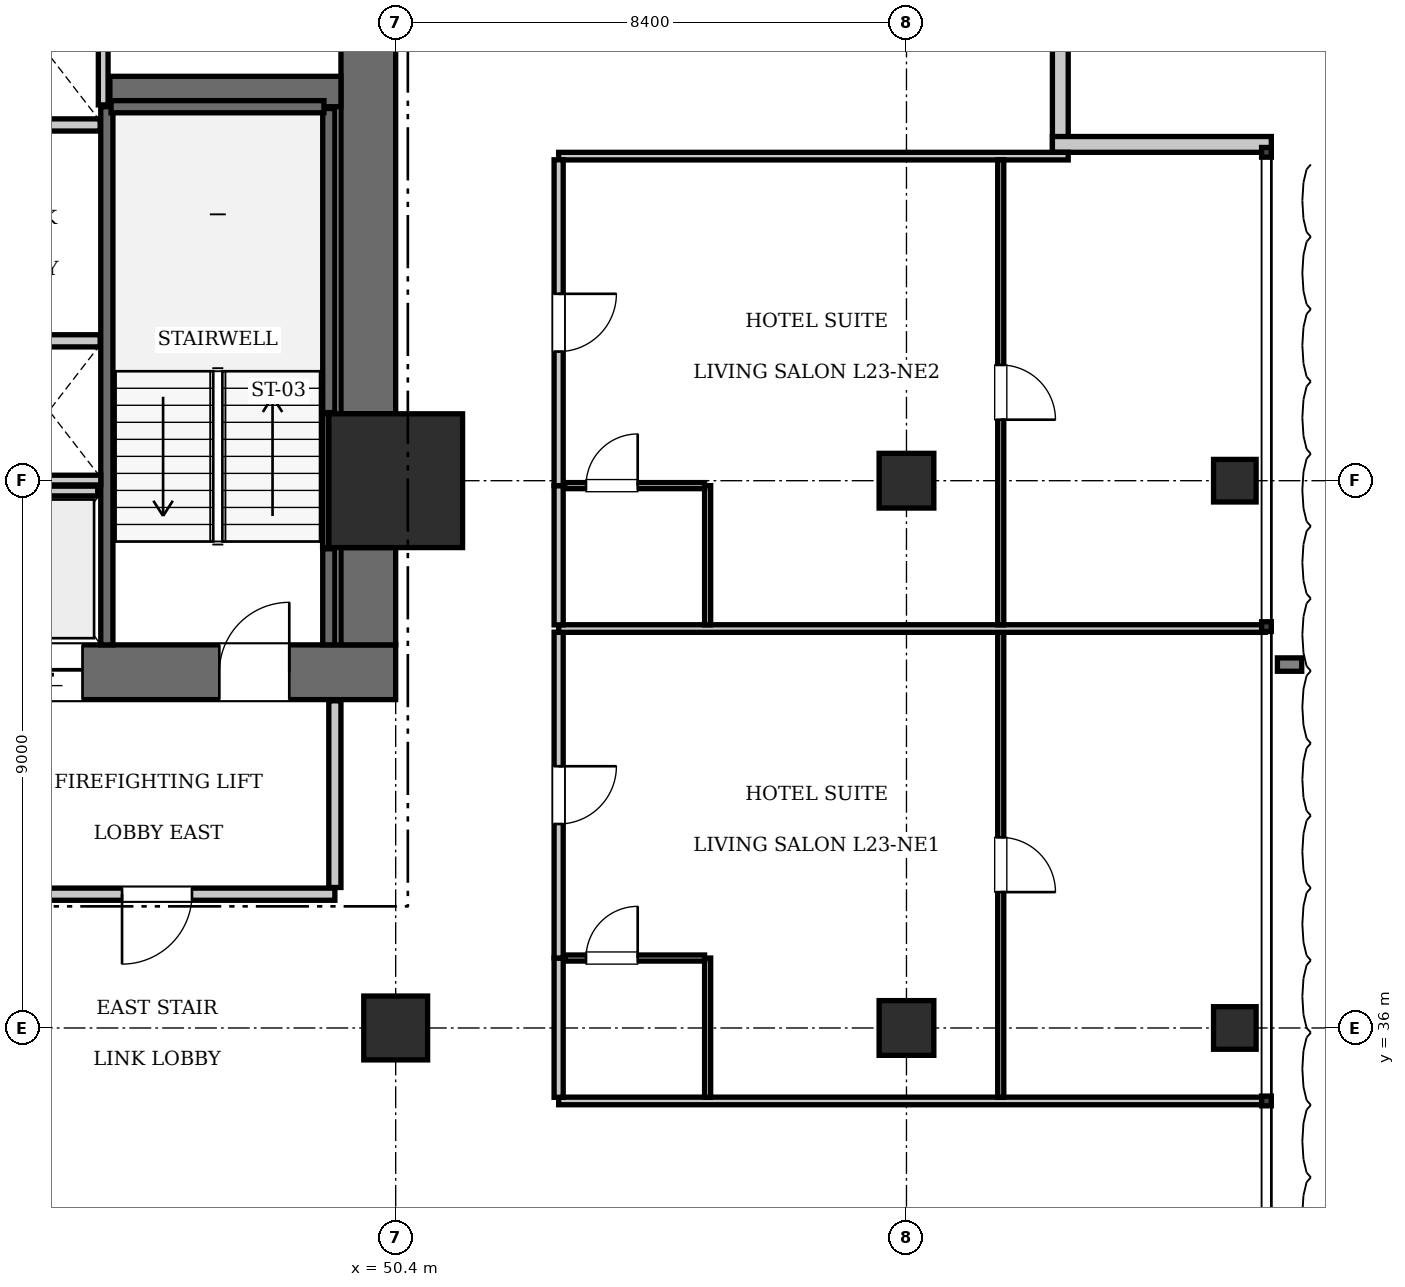
"""IFC4 building model, lengths in metres.
Left out: names, types, materials, properties, quantities, classifications, styles, units other than length and angle.
Written with IfcOpenShell. Run it as: python <this file> out.ifc"""

import sys

from ifc_helpers import new_model, si_unit, direction, frame, frame_2d, origin, origin_2d, place, context, subcontext, project, spatial, rectangle, i_section, extrude, element, fill, save


model = new_model("IFC4")
c1 = context("Model", 3, precision=1e-05, world=origin(), true_north=direction((0.0, 1.0)))
c2 = subcontext(c1, "Body", "Model", "MODEL_VIEW")
j1 = project(units=[si_unit("LENGTHUNIT", "METRE"), si_unit("PLANEANGLEUNIT", "RADIAN")], contexts=[c1])
p1 = place(None, origin())
s1 = spatial("IfcSite", under=j1, at=p1, CompositionType="ELEMENT")
p2 = place(p1, origin())
s2 = spatial("IfcBuilding", under=s1, at=p2, CompositionType="ELEMENT")
p3 = place(p2, frame((0.0, 0.0, 96.25)))
s3 = spatial("IfcBuildingStorey", under=s2, at=p3, CompositionType="ELEMENT", Elevation=96.25)
p4 = place(p3, frame((50.4, 45.0, 0.0), z_axis=(0.0, 0.0, 1.0), x_axis=(1.0, 0.0, 0.0)))
e1 = element("IfcColumn", 1, at=p4, inside=s3, PredefinedType="COLUMN", context=c2, shape_type="SweptSolid", body=[
    extrude(rectangle(XDim=2.2, YDim=2.2, at=origin_2d()), origin(), (0.0, 0.0, 1.0), 3.85),
])
p5 = place(p3, frame((43.6, 41.85, 0.0), z_axis=(0.0, 0.0, 1.0), x_axis=(1.0, 0.0, 0.0)))
e2 = element("IfcWall", 2, at=p5, inside=s3, PredefinedType="SHEAR", context=c2, shape_type="SweptSolid", body=[
    extrude(rectangle(XDim=6.8, YDim=0.9, at=frame_2d((3.4, 0.0))), origin(), (0.0, 0.0, 1.0), 3.85),
])
p6 = place(p5, frame((3.9, 0.0, 0.0)))
e3 = element("IfcOpeningElement", 3, at=p6, cuts=e2, PredefinedType="OPENING", context=c2, shape_type="SweptSolid", body=[
    extrude(rectangle(XDim=1.15, YDim=2.15, at=frame_2d((0.575, 1.075))), frame((0.0, 0.46, 0.0), z_axis=(0.0, -1.0, 0.0), x_axis=(1.0, 0.0, 0.0)), (0.0, 0.0, 1.0), 0.92),
])
p7 = place(p5, frame((0.55, 0.0, 0.0)))
e4 = element("IfcOpeningElement", 4, at=p7, cuts=e2, PredefinedType="OPENING", context=c2, shape_type="SweptSolid", body=[
    extrude(rectangle(XDim=1.1, YDim=2.2, at=frame_2d((0.55, 1.1))), frame((0.0, 0.46, 0.0), z_axis=(0.0, -1.0, 0.0), x_axis=(1.0, 0.0, 0.0)), (0.0, 0.0, 1.0), 0.92),
])
p8 = place(p3, frame((49.95, 42.3, 0.0), z_axis=(0.0, 0.0, 1.0), x_axis=(0.0, 1.0, 0.0)))
e5 = element("IfcWall", 5, at=p8, inside=s3, PredefinedType="SHEAR", context=c2, shape_type="SweptSolid", body=[
    extrude(rectangle(XDim=1.6, YDim=0.9, at=frame_2d((0.8, 0.0))), origin(), (0.0, 0.0, 1.0), 3.85),
])
p9 = place(p3, frame((49.95, 46.1, 0.0), z_axis=(0.0, 0.0, 1.0), x_axis=(0.0, 1.0, 0.0)))
e6 = element("IfcWall", 6, at=p9, inside=s3, PredefinedType="SHEAR", context=c2, shape_type="SweptSolid", body=[
    extrude(rectangle(XDim=7.0, YDim=0.9, at=frame_2d((3.5, 0.0))), origin(), (0.0, 0.0, 1.0), 3.85),
])
p10 = place(p3, frame((45.7, 51.4, 0.0), z_axis=(0.0, 0.0, 1.0), x_axis=(1.0, 0.0, 0.0)))
e7 = element("IfcWall", 7, at=p10, inside=s3, PredefinedType="SHEAR", context=c2, shape_type="SweptSolid", body=[
    extrude(rectangle(XDim=3.8, YDim=0.5, at=frame_2d((1.9, 0.0))), origin(), (0.0, 0.0, 1.0), 3.85),
])
p11 = place(p3, frame((50.4, 36.0, 0.0), z_axis=(0.0, 0.0, 1.0), x_axis=(1.0, 0.0, 0.0)))
e8 = element("IfcColumn", 8, at=p11, inside=s3, PredefinedType="COLUMN", context=c2, shape_type="SweptSolid", body=[
    extrude(rectangle(XDim=1.05, YDim=1.05, at=origin_2d()), origin(), (0.0, 0.0, 1.0), 3.85),
])
for number, where, z_axis, x_axis in (
    (9, (58.8, 36.0, 0.0), (0.0, 0.0, 1.0), (1.0, 0.0, 0.0)),
    (10, (58.8, 45.0, 0.0), (0.0, 0.0, 1.0), (1.0, 0.0, 0.0)),
):
    element("IfcColumn", number, at=place(p3, frame(where, z_axis=z_axis, x_axis=x_axis)), inside=s3, PredefinedType="COLUMN", context=c2, shape_type="SweptSolid", body=[
        extrude(rectangle(XDim=0.9, YDim=0.9, at=origin_2d()), origin(), (0.0, 0.0, 1.0), 3.85),
    ])
for number, where, z_axis, x_axis in (
    (11, (64.2, 36.0, 0.0), (0.0, 0.0, 1.0), (1.0, 0.0, 0.0)),
    (12, (64.2, 45.0, 0.0), (0.0, 0.0, 1.0), (1.0, 0.0, 0.0)),
):
    element("IfcColumn", number, at=place(p3, frame(where, z_axis=z_axis, x_axis=x_axis)), inside=s3, PredefinedType="COLUMN", context=c2, shape_type="SweptSolid", body=[
        extrude(i_section(OverallWidth=0.7, OverallDepth=0.7, WebThickness=0.028, FlangeThickness=0.044, at=origin_2d()), origin(), (0.0, 0.0, 1.0), 3.85),
    ])
p12 = place(p3, frame((45.65, 42.3, 0.0), z_axis=(0.0, 0.0, 1.0), x_axis=(0.0, 1.0, 0.0)))
e13 = element("IfcWall", 13, at=p12, inside=s3, PredefinedType="SOLIDWALL", context=c2, shape_type="SweptSolid", body=[
    extrude(rectangle(XDim=8.85, YDim=0.2, at=frame_2d((4.425, 0.0))), origin(), (0.0, 0.0, 1.0), 3.61),
])
p13 = place(p3, frame((49.3, 42.3, 0.0), z_axis=(0.0, 0.0, 1.0), x_axis=(0.0, 1.0, 0.0)))
e14 = element("IfcWall", 14, at=p13, inside=s3, PredefinedType="SOLIDWALL", context=c2, shape_type="SweptSolid", body=[
    extrude(rectangle(XDim=1.58, YDim=0.2, at=frame_2d((0.79, 0.0))), origin(), (0.0, 0.0, 1.0), 3.61),
])
p14 = place(p3, frame((49.3, 46.12, 0.0), z_axis=(0.0, 0.0, 1.0), x_axis=(0.0, 1.0, 0.0)))
e15 = element("IfcWall", 15, at=p14, inside=s3, PredefinedType="SOLIDWALL", context=c2, shape_type="SweptSolid", body=[
    extrude(rectangle(XDim=5.0, YDim=0.2, at=frame_2d((2.5, 0.0))), origin(), (0.0, 0.0, 1.0), 3.61),
])
p15 = place(p3, frame((45.72, 51.15, 0.0), z_axis=(0.0, 0.0, 1.0), x_axis=(1.0, 0.0, 0.0)))
e16 = element("IfcWall", 16, at=p15, inside=s3, PredefinedType="SOLIDWALL", context=c2, shape_type="SweptSolid", body=[
    extrude(rectangle(XDim=3.5, YDim=0.2, at=frame_2d((1.75, 0.0))), origin(), (0.0, 0.0, 1.0), 3.61),
])
p16 = place(p3, frame((49.248, 43.9, 0.0), z_axis=(0.0, 0.0, 1.0), x_axis=(0.0, 1.0, 0.0)))
e17 = element("IfcWall", 17, at=p16, inside=s3, PredefinedType="SOLIDWALL", context=c2, shape_type="SweptSolid", body=[
    extrude(rectangle(XDim=2.2, YDim=0.1, at=frame_2d((1.1, 0.0))), origin(), (0.0, 0.0, 1.0), 3.61),
])
for number, where, z_axis, x_axis in (
    (18, (43.86, 47.3, 0.0), (0.0, 0.0, 1.0), (1.0, 0.0, 0.0)),
    (19, (43.86, 50.85, 0.0), (0.0, 0.0, 1.0), (1.0, 0.0, 0.0)),
):
    element("IfcWall", number, at=place(p3, frame(where, z_axis=z_axis, x_axis=x_axis)), inside=s3, PredefinedType="SOLIDWALL", context=c2, shape_type="SweptSolid", body=[
        extrude(rectangle(XDim=1.68, YDim=0.2, at=frame_2d((0.84, 0.0))), origin(), (0.0, 0.0, 1.0), 3.61),
    ])
p17 = place(p3, frame((43.9, 44.83, 0.0), z_axis=(0.0, 0.0, 1.0), x_axis=(1.0, 0.0, 0.0)))
e20 = element("IfcWall", 20, at=p17, inside=s3, PredefinedType="SOLIDWALL", context=c2, shape_type="SweptSolid", body=[
    extrude(rectangle(XDim=1.6, YDim=0.16, at=frame_2d((0.8, 0.0))), origin(), (0.0, 0.0, 1.0), 3.61),
])
p18 = place(p3, frame((42.1, 45.01, 0.0), z_axis=(0.0, 0.0, 1.0), x_axis=(1.0, 0.0, 0.0)))
e21 = element("IfcWall", 21, at=p18, inside=s3, PredefinedType="SOLIDWALL", context=c2, shape_type="SweptSolid", body=[
    extrude(rectangle(XDim=3.45, YDim=0.16, at=frame_2d((1.725, 0.0))), origin(), (0.0, 0.0, 1.0), 3.61),
])
p19 = place(p3, frame((45.59, 51.18, 0.0), z_axis=(0.0, 0.0, 1.0), x_axis=(0.0, 1.0, 0.0)))
e22 = element("IfcWall", 22, at=p19, inside=s3, PredefinedType="SOLIDWALL", context=c2, shape_type="SweptSolid", body=[
    extrude(rectangle(XDim=1.92, YDim=0.16, at=frame_2d((0.96, 0.0))), origin(), (0.0, 0.0, 1.0), 3.61),
])
for number, where, z_axis, x_axis in (
    (23, (61.33, 54.0, 0.0), (0.0, 0.0, 1.0), (0.0, -1.0, 0.0)),
    (24, (61.2, 50.53, 0.0), (0.0, 0.0, 1.0), (1.0, 0.0, 0.0)),
):
    element("IfcWall", number, at=place(p3, frame(where, z_axis=z_axis, x_axis=x_axis)), inside=s3, PredefinedType="SOLIDWALL", context=c2, shape_type="SweptSolid", body=[
        extrude(rectangle(XDim=3.6, YDim=0.26, at=frame_2d((1.8, 0.0))), origin(), (0.0, 0.0, 1.0), 3.61),
    ])
p20 = place(p3, frame((43.6, 38.2, 0.0), z_axis=(0.0, 0.0, 1.0), x_axis=(1.0, 0.0, 0.0)))
e25 = element("IfcWall", 25, at=p20, inside=s3, PredefinedType="PARTITIONING", context=c2, shape_type="SweptSolid", body=[
    extrude(rectangle(XDim=5.8, YDim=0.2, at=frame_2d((2.9, 0.0))), origin(), (0.0, 0.0, 1.0), 3.61),
])
p21 = place(p20, frame((2.3, 0.0, 0.0)))
e26 = element("IfcOpeningElement", 26, at=p21, cuts=e25, PredefinedType="OPENING", context=c2, shape_type="SweptSolid", body=[
    extrude(rectangle(XDim=1.15, YDim=2.15, at=frame_2d((0.575, 1.075))), frame((0.0, 0.11, 0.0), z_axis=(0.0, -1.0, 0.0), x_axis=(1.0, 0.0, 0.0)), (0.0, 0.0, 1.0), 0.22),
])
p22 = place(p3, frame((49.4, 38.31, 0.0), z_axis=(0.0, 0.0, 1.0), x_axis=(0.0, 1.0, 0.0)))
e27 = element("IfcWall", 27, at=p22, inside=s3, PredefinedType="PARTITIONING", context=c2, shape_type="SweptSolid", body=[
    extrude(rectangle(XDim=3.07, YDim=0.2, at=frame_2d((1.535, 0.0))), origin(), (0.0, 0.0, 1.0), 3.61),
])
p23 = place(p3, frame((53.08, 34.8, 0.0), z_axis=(0.0, 0.0, 1.0), x_axis=(1.0, 0.0, 0.0)))
e28 = element("IfcWall", 28, at=p23, inside=s3, PredefinedType="PARTITIONING", context=c2, shape_type="SweptSolid", body=[
    extrude(rectangle(XDim=11.62, YDim=0.125, at=frame_2d((5.81, 0.0))), origin(), (0.0, 0.0, 1.0), 3.61),
])
p24 = place(p3, frame((53.08, 50.337, 0.0), z_axis=(0.0, 0.0, 1.0), x_axis=(1.0, 0.0, 0.0)))
e29 = element("IfcWall", 29, at=p24, inside=s3, PredefinedType="PARTITIONING", context=c2, shape_type="SweptSolid", body=[
    extrude(rectangle(XDim=8.38, YDim=0.125, at=frame_2d((4.19, 0.0))), origin(), (0.0, 0.0, 1.0), 3.61),
])
p25 = place(p3, frame((53.08, 34.86, 0.0), z_axis=(0.0, 0.0, 1.0), x_axis=(0.0, 1.0, 0.0)))
e30 = element("IfcWall", 30, at=p25, inside=s3, PredefinedType="PARTITIONING", context=c2, shape_type="SweptSolid", body=[
    extrude(rectangle(XDim=2.29, YDim=0.15, at=frame_2d((1.145, 0.0))), origin(), (0.0, 0.0, 1.0), 3.61),
])
p26 = place(p3, frame((53.08, 37.15, 0.0), z_axis=(0.0, 0.0, 1.0), x_axis=(0.0, 1.0, 0.0)))
e31 = element("IfcWall", 31, at=p26, inside=s3, PredefinedType="PARTITIONING", context=c2, shape_type="SweptSolid", body=[
    extrude(rectangle(XDim=5.359, YDim=0.15, at=frame_2d((2.679, 0.0))), origin(), (0.0, 0.0, 1.0), 3.61),
])
p27 = place(p26, frame((2.204, 0.0, 0.0)))
e32 = element("IfcOpeningElement", 32, at=p27, cuts=e31, PredefinedType="OPENING", context=c2, shape_type="SweptSolid", body=[
    extrude(rectangle(XDim=0.95, YDim=2.15, at=frame_2d((0.475, 1.075))), frame((0.0, 0.085, 0.0), z_axis=(0.0, -1.0, 0.0), x_axis=(1.0, 0.0, 0.0)), (0.0, 0.0, 1.0), 0.17),
])
p28 = place(p3, frame((55.53, 34.86, 0.0), z_axis=(0.0, 0.0, 1.0), x_axis=(0.0, 1.0, 0.0)))
e33 = element("IfcWall", 33, at=p28, inside=s3, PredefinedType="PARTITIONING", context=c2, shape_type="SweptSolid", body=[
    extrude(rectangle(XDim=2.29, YDim=0.1, at=frame_2d((1.145, 0.0))), origin(), (0.0, 0.0, 1.0), 3.61),
])
p29 = place(p3, frame((53.18, 37.15, 0.0), z_axis=(0.0, 0.0, 1.0), x_axis=(1.0, 0.0, 0.0)))
e34 = element("IfcWall", 34, at=p29, inside=s3, PredefinedType="PARTITIONING", context=c2, shape_type="SweptSolid", body=[
    extrude(rectangle(XDim=2.3, YDim=0.1, at=frame_2d((1.15, 0.0))), origin(), (0.0, 0.0, 1.0), 3.61),
])
p30 = place(p29, frame((0.35, 0.0, 0.0)))
e35 = element("IfcOpeningElement", 35, at=p30, cuts=e34, PredefinedType="OPENING", context=c2, shape_type="SweptSolid", body=[
    extrude(rectangle(XDim=0.85, YDim=2.1, at=frame_2d((0.425, 1.05))), frame((0.0, 0.06, 0.0), z_axis=(0.0, -1.0, 0.0), x_axis=(1.0, 0.0, 0.0)), (0.0, 0.0, 1.0), 0.12),
])
p31 = place(p3, frame((60.35, 34.86, 0.0), z_axis=(0.0, 0.0, 1.0), x_axis=(0.0, 1.0, 0.0)))
e36 = element("IfcWall", 36, at=p31, inside=s3, PredefinedType="PARTITIONING", context=c2, shape_type="SweptSolid", body=[
    extrude(rectangle(XDim=7.649, YDim=0.1, at=frame_2d((3.824, 0.0))), origin(), (0.0, 0.0, 1.0), 3.61),
])
p32 = place(p31, frame((3.374, 0.0, 0.0)))
e37 = element("IfcOpeningElement", 37, at=p32, cuts=e36, PredefinedType="OPENING", context=c2, shape_type="SweptSolid", body=[
    extrude(rectangle(XDim=0.9, YDim=2.1, at=frame_2d((0.45, 1.05))), frame((0.0, 0.06, 0.0), z_axis=(0.0, -1.0, 0.0), x_axis=(1.0, 0.0, 0.0)), (0.0, 0.0, 1.0), 0.12),
])
p33 = place(p3, frame((53.08, 42.569, 0.0), z_axis=(0.0, 0.0, 1.0), x_axis=(1.0, 0.0, 0.0)))
e38 = element("IfcWall", 38, at=p33, inside=s3, PredefinedType="PARTITIONING", context=c2, shape_type="SweptSolid", body=[
    extrude(rectangle(XDim=11.62, YDim=0.125, at=frame_2d((5.81, 0.0))), origin(), (0.0, 0.0, 1.0), 3.61),
])
p34 = place(p3, frame((53.08, 42.629, 0.0), z_axis=(0.0, 0.0, 1.0), x_axis=(0.0, 1.0, 0.0)))
e39 = element("IfcWall", 39, at=p34, inside=s3, PredefinedType="PARTITIONING", context=c2, shape_type="SweptSolid", body=[
    extrude(rectangle(XDim=2.29, YDim=0.15, at=frame_2d((1.145, 0.0))), origin(), (0.0, 0.0, 1.0), 3.61),
])
p35 = place(p3, frame((53.08, 44.919, 0.0), z_axis=(0.0, 0.0, 1.0), x_axis=(0.0, 1.0, 0.0)))
e40 = element("IfcWall", 40, at=p35, inside=s3, PredefinedType="PARTITIONING", context=c2, shape_type="SweptSolid", body=[
    extrude(rectangle(XDim=5.359, YDim=0.15, at=frame_2d((2.679, 0.0))), origin(), (0.0, 0.0, 1.0), 3.61),
])
p36 = place(p35, frame((2.204, 0.0, 0.0)))
e41 = element("IfcOpeningElement", 41, at=p36, cuts=e40, PredefinedType="OPENING", context=c2, shape_type="SweptSolid", body=[
    extrude(rectangle(XDim=0.95, YDim=2.15, at=frame_2d((0.475, 1.075))), frame((0.0, 0.085, 0.0), z_axis=(0.0, -1.0, 0.0), x_axis=(1.0, 0.0, 0.0)), (0.0, 0.0, 1.0), 0.17),
])
p37 = place(p3, frame((55.53, 42.629, 0.0), z_axis=(0.0, 0.0, 1.0), x_axis=(0.0, 1.0, 0.0)))
e42 = element("IfcWall", 42, at=p37, inside=s3, PredefinedType="PARTITIONING", context=c2, shape_type="SweptSolid", body=[
    extrude(rectangle(XDim=2.29, YDim=0.1, at=frame_2d((1.145, 0.0))), origin(), (0.0, 0.0, 1.0), 3.61),
])
p38 = place(p3, frame((53.18, 44.919, 0.0), z_axis=(0.0, 0.0, 1.0), x_axis=(1.0, 0.0, 0.0)))
e43 = element("IfcWall", 43, at=p38, inside=s3, PredefinedType="PARTITIONING", context=c2, shape_type="SweptSolid", body=[
    extrude(rectangle(XDim=2.3, YDim=0.1, at=frame_2d((1.15, 0.0))), origin(), (0.0, 0.0, 1.0), 2.999),
])
p39 = place(p38, frame((0.35, 0.0, 0.0)))
e44 = element("IfcOpeningElement", 44, at=p39, cuts=e43, PredefinedType="OPENING", context=c2, shape_type="SweptSolid", body=[
    extrude(rectangle(XDim=0.85, YDim=2.1, at=frame_2d((0.425, 1.05))), frame((0.0, 0.06, 0.0), z_axis=(0.0, -1.0, 0.0), x_axis=(1.0, 0.0, 0.0)), (0.0, 0.0, 1.0), 0.12),
])
p40 = place(p3, frame((60.35, 42.629, 0.0), z_axis=(0.0, 0.0, 1.0), x_axis=(0.0, 1.0, 0.0)))
e45 = element("IfcWall", 45, at=p40, inside=s3, PredefinedType="PARTITIONING", context=c2, shape_type="SweptSolid", body=[
    extrude(rectangle(XDim=7.649, YDim=0.1, at=frame_2d((3.824, 0.0))), origin(), (0.0, 0.0, 1.0), 3.61),
])
p41 = place(p40, frame((3.375, 0.0, 0.0)))
e46 = element("IfcOpeningElement", 46, at=p41, cuts=e45, PredefinedType="OPENING", context=c2, shape_type="SweptSolid", body=[
    extrude(rectangle(XDim=0.9, YDim=2.1, at=frame_2d((0.45, 1.05))), frame((0.0, 0.06, 0.0), z_axis=(0.0, -1.0, 0.0), x_axis=(1.0, 0.0, 0.0)), (0.0, 0.0, 1.0), 0.12),
])
p42 = place(p6, origin())
e47 = element("IfcDoor", 47, at=p42, inside=s3, OperationType="SINGLE_SWING_RIGHT", PredefinedType="DOOR", context=c2, shape_type="SweptSolid", body=[
    extrude(rectangle(XDim=1.15, YDim=2.15, at=frame_2d((0.575, 1.075))), frame((0.0, 0.025, 0.0), z_axis=(0.0, -1.0, 0.0), x_axis=(1.0, 0.0, 0.0)), (0.0, 0.0, 1.0), 0.05),
])
fill(e3, e47)
p43 = place(p7, frame((1.1, 0.0, 0.0), z_axis=(0.0, 0.0, 1.0), x_axis=(-1.0, 0.0, 0.0)))
e48 = element("IfcDoor", 48, at=p43, inside=s3, OperationType="SLIDING_TO_LEFT", PredefinedType="DOOR", context=c2, shape_type="SweptSolid", body=[
    extrude(rectangle(XDim=1.1, YDim=2.2, at=frame_2d((0.55, 1.1))), frame((0.0, 0.025, 0.0), z_axis=(0.0, -1.0, 0.0), x_axis=(1.0, 0.0, 0.0)), (0.0, 0.0, 1.0), 0.05),
])
fill(e4, e48)
p44 = place(p21, frame((1.15, 0.0, 0.0), z_axis=(0.0, 0.0, 1.0), x_axis=(-1.0, 0.0, 0.0)))
e49 = element("IfcDoor", 49, at=p44, inside=s3, OperationType="SINGLE_SWING_RIGHT", PredefinedType="DOOR", context=c2, shape_type="SweptSolid", body=[
    extrude(rectangle(XDim=1.15, YDim=2.15, at=frame_2d((0.575, 1.075))), frame((0.0, 0.025, 0.0), z_axis=(0.0, -1.0, 0.0), x_axis=(1.0, 0.0, 0.0)), (0.0, 0.0, 1.0), 0.05),
])
fill(e26, e49)
p45 = place(p30, origin())
e50 = element("IfcDoor", 50, at=p45, inside=s3, OperationType="SINGLE_SWING_RIGHT", PredefinedType="DOOR", context=c2, shape_type="SweptSolid", body=[
    extrude(rectangle(XDim=0.85, YDim=2.1, at=frame_2d((0.425, 1.05))), frame((0.0, 0.025, 0.0), z_axis=(0.0, -1.0, 0.0), x_axis=(1.0, 0.0, 0.0)), (0.0, 0.0, 1.0), 0.05),
])
fill(e35, e50)
p46 = place(p27, frame((0.95, 0.0, 0.0), z_axis=(0.0, 0.0, 1.0), x_axis=(-1.0, 0.0, 0.0)))
e51 = element("IfcDoor", 51, at=p46, inside=s3, OperationType="SINGLE_SWING_LEFT", PredefinedType="DOOR", context=c2, shape_type="SweptSolid", body=[
    extrude(rectangle(XDim=0.95, YDim=2.15, at=frame_2d((0.475, 1.075))), frame((0.0, 0.025, 0.0), z_axis=(0.0, -1.0, 0.0), x_axis=(1.0, 0.0, 0.0)), (0.0, 0.0, 1.0), 0.05),
])
fill(e32, e51)
p47 = place(p32, frame((0.9, 0.0, 0.0), z_axis=(0.0, 0.0, 1.0), x_axis=(-1.0, 0.0, 0.0)))
e52 = element("IfcDoor", 52, at=p47, inside=s3, OperationType="SINGLE_SWING_RIGHT", PredefinedType="DOOR", context=c2, shape_type="SweptSolid", body=[
    extrude(rectangle(XDim=0.9, YDim=2.1, at=frame_2d((0.45, 1.05))), frame((0.0, 0.025, 0.0), z_axis=(0.0, -1.0, 0.0), x_axis=(1.0, 0.0, 0.0)), (0.0, 0.0, 1.0), 0.05),
])
fill(e37, e52)
p48 = place(p39, origin())
e53 = element("IfcDoor", 53, at=p48, inside=s3, OperationType="SINGLE_SWING_RIGHT", PredefinedType="DOOR", context=c2, shape_type="SweptSolid", body=[
    extrude(rectangle(XDim=0.85, YDim=2.1, at=frame_2d((0.425, 1.05))), frame((0.0, 0.025, 0.0), z_axis=(0.0, -1.0, 0.0), x_axis=(1.0, 0.0, 0.0)), (0.0, 0.0, 1.0), 0.05),
])
fill(e44, e53)
p49 = place(p36, frame((0.95, 0.0, 0.0), z_axis=(0.0, 0.0, 1.0), x_axis=(-1.0, 0.0, 0.0)))
e54 = element("IfcDoor", 54, at=p49, inside=s3, OperationType="SINGLE_SWING_LEFT", PredefinedType="DOOR", context=c2, shape_type="SweptSolid", body=[
    extrude(rectangle(XDim=0.95, YDim=2.15, at=frame_2d((0.475, 1.075))), frame((0.0, 0.025, 0.0), z_axis=(0.0, -1.0, 0.0), x_axis=(1.0, 0.0, 0.0)), (0.0, 0.0, 1.0), 0.05),
])
fill(e41, e54)
p50 = place(p41, frame((0.9, 0.0, 0.0), z_axis=(0.0, 0.0, 1.0), x_axis=(-1.0, 0.0, 0.0)))
e55 = element("IfcDoor", 55, at=p50, inside=s3, OperationType="SINGLE_SWING_RIGHT", PredefinedType="DOOR", context=c2, shape_type="SweptSolid", body=[
    extrude(rectangle(XDim=0.9, YDim=2.1, at=frame_2d((0.45, 1.05))), frame((0.0, 0.025, 0.0), z_axis=(0.0, -1.0, 0.0), x_axis=(1.0, 0.0, 0.0)), (0.0, 0.0, 1.0), 0.05),
])
fill(e46, e55)
save(model, sys.argv[1])
